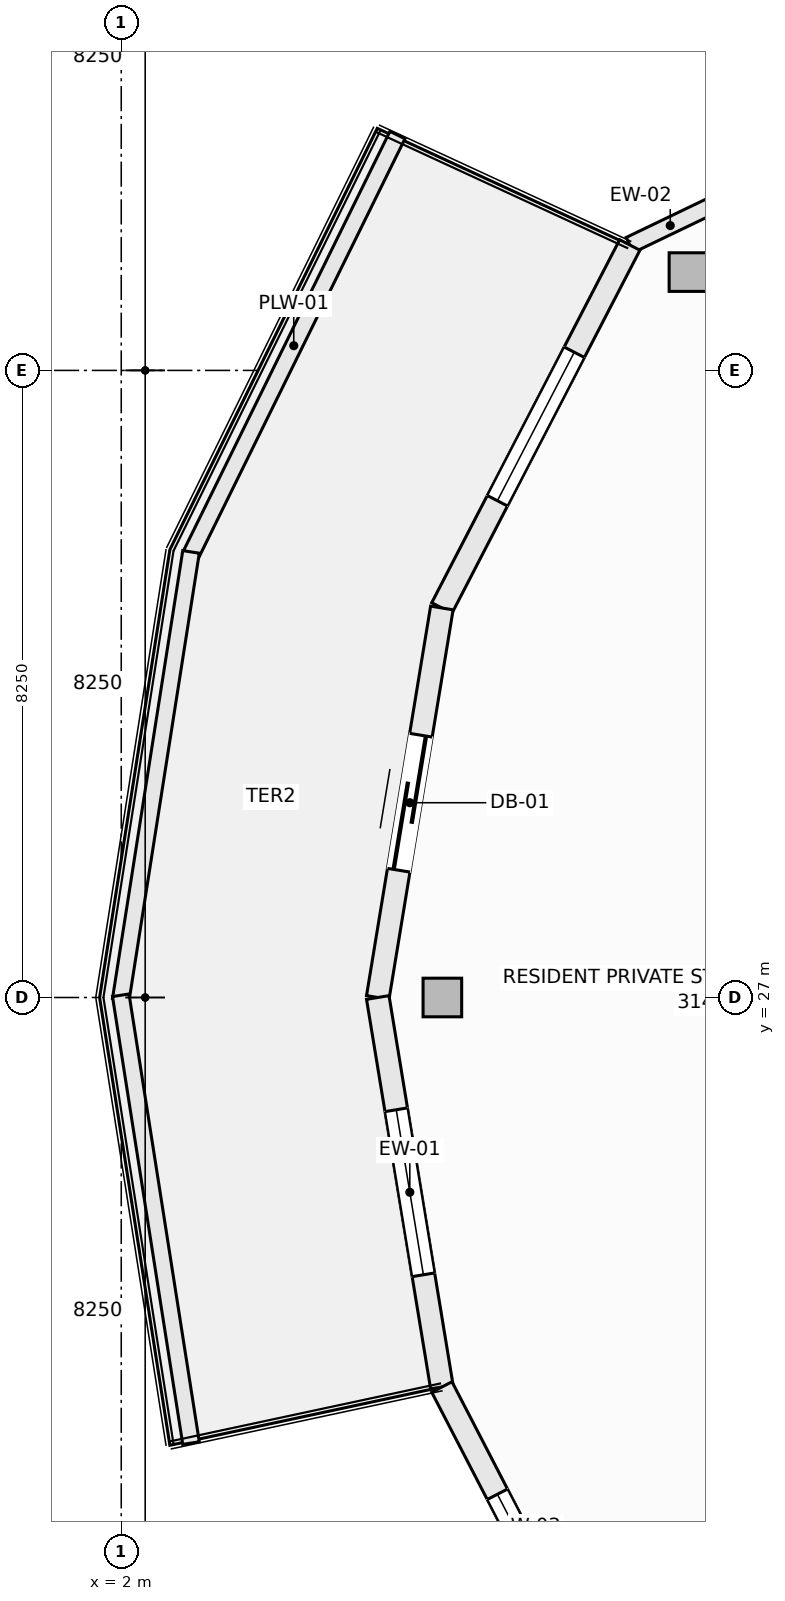
"""IFC4 building model, lengths in metres.
Left out: names, types, materials, properties, quantities, classifications, styles, units other than length and angle.
Written with IfcOpenShell. Run it as: python <this file> out.ifc"""

import sys

from ifc_helpers import new_model, si_unit, direction, frame, frame_2d, origin, origin_2d, place, context, subcontext, project, spatial, rectangle, hollow_rectangle, extrude, element, fill, save


model = new_model("IFC4")
c1 = context("Model", 3, precision=1e-05, world=origin(), true_north=direction((0.0, 1.0)))
c2 = subcontext(c1, "Body", "Model", "MODEL_VIEW")
j1 = project(units=[si_unit("LENGTHUNIT", "METRE"), si_unit("PLANEANGLEUNIT", "RADIAN")], contexts=[c1])
p1 = place(None, origin())
s1 = spatial("IfcSite", under=j1, at=p1, CompositionType="ELEMENT")
p2 = place(p1, origin())
s2 = spatial("IfcBuilding", under=s1, at=p2, CompositionType="ELEMENT")
p3 = place(p2, frame((0.0, 0.0, 206.3)))
s3 = spatial("IfcBuildingStorey", under=s2, at=p3, CompositionType="ELEMENT", Elevation=206.3)
for number, where, z_axis, x_axis in (
    (1, (9.463, 36.544, -0.27), (0.0, 0.0, 1.0), (1.0, 0.0, 0.0)),
    (2, (6.225, 27.0, -0.27), (0.0, 0.0, 1.0), (1.0, 0.0, 0.0)),
):
    element("IfcColumn", number, at=place(p3, frame(where, z_axis=z_axis, x_axis=x_axis)), inside=s3, PredefinedType="COLUMN", context=c2, shape_type="SweptSolid", body=[
        extrude(hollow_rectangle(XDim=0.508, YDim=0.508, WallThickness=0.019, at=origin_2d()), origin(), (0.0, 0.0, 1.0), 3.3),
    ])
p4 = place(p3, frame((8.691, 36.9, 0.0), z_axis=(0.0, 0.0, 1.0), x_axis=(0.901264843027, 0.433268603437, 0.0)))
e3 = element("IfcWall", 3, at=p4, inside=s3, PredefinedType="SOLIDWALL", context=c2, shape_type="SweptSolid", body=[
    extrude(rectangle(XDim=1.181, YDim=0.22, at=frame_2d((0.591, 0.0))), origin(), (0.0, 0.0, 1.0), 2.605),
])
p5 = place(p3, frame((6.218, 32.125, 0.0), z_axis=(0.0, 0.0, 1.0), x_axis=(0.459808219482, 0.888018243786, 0.0)))
e4 = element("IfcWall", 4, at=p5, inside=s3, PredefinedType="SOLIDWALL", context=c2, shape_type="SweptSolid", body=[
    extrude(rectangle(XDim=5.378, YDim=0.3, at=frame_2d((2.689, 0.0))), origin(), (0.0, 0.0, 1.0), 2.605),
])
p6 = place(p5, frame((1.589, 0.0, 0.72)))
e5 = element("IfcOpeningElement", 5, at=p6, cuts=e4, PredefinedType="OPENING", context=c2, shape_type="SweptSolid", body=[
    extrude(rectangle(XDim=2.2, YDim=1.65, at=frame_2d((1.1, 0.825))), frame((0.0, 0.16, 0.0), z_axis=(0.0, -1.0, 0.0), x_axis=(1.0, 0.0, 0.0)), (0.0, 0.0, 1.0), 0.32),
])
p7 = place(p3, frame((5.375, 27.0, 0.0), z_axis=(0.0, 0.0, 1.0), x_axis=(0.16237087798, 0.986729799886, 0.0)))
e6 = element("IfcWall", 6, at=p7, inside=s3, PredefinedType="SOLIDWALL", context=c2, shape_type="SweptSolid", body=[
    extrude(rectangle(XDim=5.193, YDim=0.3, at=frame_2d((2.597, 0.0))), origin(), (0.0, 0.0, 1.0), 2.605),
])
p8 = place(p7, frame((1.697, 0.0, 0.0)))
e7 = element("IfcOpeningElement", 7, at=p8, cuts=e6, PredefinedType="OPENING", context=c2, shape_type="SweptSolid", body=[
    extrude(rectangle(XDim=1.8, YDim=2.25, at=frame_2d((0.9, 1.125))), frame((0.0, 0.16, 0.0), z_axis=(0.0, -1.0, 0.0), x_axis=(1.0, 0.0, 0.0)), (0.0, 0.0, 1.0), 0.32),
])
p9 = place(p3, frame((5.375, 27.0, 0.0), z_axis=(0.0, 0.0, 1.0), x_axis=(0.16237087798, -0.986729799886, 0.0)))
e8 = element("IfcWall", 8, at=p9, inside=s3, PredefinedType="SOLIDWALL", context=c2, shape_type="SweptSolid", body=[
    extrude(rectangle(XDim=5.193, YDim=0.3, at=frame_2d((2.597, 0.0))), origin(), (0.0, 0.0, 1.0), 2.605),
])
p10 = place(p9, frame((1.497, 0.0, 0.72)))
e9 = element("IfcOpeningElement", 9, at=p10, cuts=e8, PredefinedType="OPENING", context=c2, shape_type="SweptSolid", body=[
    extrude(rectangle(XDim=2.2, YDim=1.65, at=frame_2d((1.1, 0.825))), frame((0.0, 0.16, 0.0), z_axis=(0.0, -1.0, 0.0), x_axis=(1.0, 0.0, 0.0)), (0.0, 0.0, 1.0), 0.32),
])
p11 = place(p3, frame((6.218, 21.875, 0.0), z_axis=(0.0, 0.0, 1.0), x_axis=(0.459808219482, -0.888018243786, 0.0)))
e10 = element("IfcWall", 10, at=p11, inside=s3, PredefinedType="SOLIDWALL", context=c2, shape_type="SweptSolid", body=[
    extrude(rectangle(XDim=5.378, YDim=0.3, at=frame_2d((2.689, 0.0))), origin(), (0.0, 0.0, 1.0), 2.605),
])
p12 = place(p11, frame((1.589, 0.0, 0.72)))
e11 = element("IfcOpeningElement", 11, at=p12, cuts=e10, PredefinedType="OPENING", context=c2, shape_type="SweptSolid", body=[
    extrude(rectangle(XDim=2.2, YDim=1.65, at=frame_2d((1.1, 0.825))), frame((0.0, 0.16, 0.0), z_axis=(0.0, -1.0, 0.0), x_axis=(1.0, 0.0, 0.0)), (0.0, 0.0, 1.0), 0.32),
])
p13 = place(p3, frame((2.906, 32.804, 0.0), z_axis=(0.0, 0.0, 1.0), x_axis=(0.441640961804, 0.897191875162, 0.0)))
e12 = element("IfcWall", 12, at=p13, inside=s3, PredefinedType="PARAPET", context=c2, shape_type="SweptSolid", body=[
    extrude(rectangle(XDim=6.178, YDim=0.22, at=frame_2d((3.089, 0.0))), origin(), (0.0, 0.0, 1.0), 0.52),
])
for number, where, z_axis, x_axis in (
    (13, (1.993, 26.971, 0.0), (0.0, 0.0, 1.0), (0.155, 0.988, 0.0)),
    (14, (1.993, 27.029, 0.0), (0.0, 0.0, 1.0), (0.155, -0.988, 0.0)),
):
    element("IfcWall", number, at=place(p3, frame(where, z_axis=z_axis, x_axis=x_axis)), inside=s3, PredefinedType="PARAPET", context=c2, shape_type="SweptSolid", body=[
        extrude(rectangle(XDim=5.964, YDim=0.22, at=frame_2d((2.982, 0.0))), origin(), (0.0, 0.0, 1.0), 0.52),
    ])
p14 = place(p6, origin())
e15 = element("IfcWindow", 15, at=p14, inside=s3, PartitioningType="SINGLE_PANEL", PredefinedType="WINDOW", context=c2, shape_type="SweptSolid", body=[
    extrude(rectangle(XDim=2.2, YDim=1.65, at=frame_2d((1.1, 0.825))), frame((0.0, 0.03, 0.0), z_axis=(0.0, -1.0, 0.0), x_axis=(1.0, 0.0, 0.0)), (0.0, 0.0, 1.0), 0.06),
])
fill(e5, e15)
p15 = place(p8, origin())
e16 = element("IfcDoor", 16, at=p15, inside=s3, OperationType="SLIDING_TO_LEFT", PredefinedType="DOOR", context=c2, shape_type="SweptSolid", body=[
    extrude(rectangle(XDim=1.8, YDim=2.25, at=frame_2d((0.9, 1.125))), frame((0.0, 0.025, 0.0), z_axis=(0.0, -1.0, 0.0), x_axis=(1.0, 0.0, 0.0)), (0.0, 0.0, 1.0), 0.05),
])
fill(e7, e16)
p16 = place(p10, origin())
e17 = element("IfcWindow", 17, at=p16, inside=s3, PartitioningType="SINGLE_PANEL", PredefinedType="WINDOW", context=c2, shape_type="SweptSolid", body=[
    extrude(rectangle(XDim=2.2, YDim=1.65, at=frame_2d((1.1, 0.825))), frame((0.0, 0.03, 0.0), z_axis=(0.0, -1.0, 0.0), x_axis=(1.0, 0.0, 0.0)), (0.0, 0.0, 1.0), 0.06),
])
fill(e9, e17)
p17 = place(p12, origin())
e18 = element("IfcWindow", 18, at=p17, inside=s3, PartitioningType="SINGLE_PANEL", PredefinedType="WINDOW", context=c2, shape_type="SweptSolid", body=[
    extrude(rectangle(XDim=2.2, YDim=1.65, at=frame_2d((1.1, 0.825))), frame((0.0, 0.03, 0.0), z_axis=(0.0, -1.0, 0.0), x_axis=(1.0, 0.0, 0.0)), (0.0, 0.0, 1.0), 0.06),
])
fill(e11, e18)
save(model, sys.argv[1])
